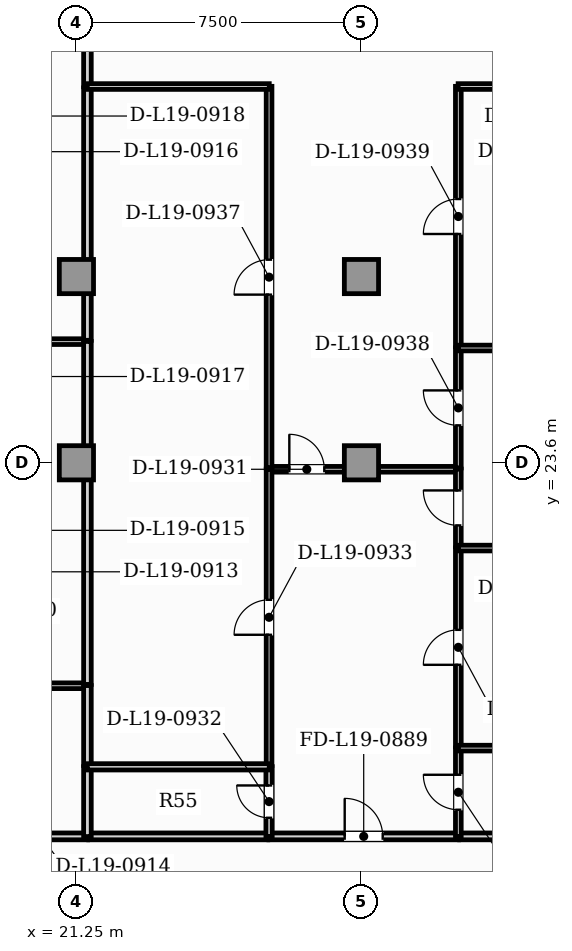
"""IFC4 building model, lengths in metres.
Left out: names, types, materials, properties, quantities, classifications, styles, units other than length and angle.
Written with IfcOpenShell. Run it as: python <this file> out.ifc"""

import sys

from ifc_helpers import new_model, si_unit, direction, frame, frame_2d, origin, origin_2d, place, context, subcontext, project, spatial, rectangle, extrude, element, fill, save


model = new_model("IFC4")
c1 = context("Model", 3, precision=1e-05, world=origin(), true_north=direction((0.0, 1.0)))
c2 = subcontext(c1, "Body", "Model", "MODEL_VIEW")
j1 = project(units=[si_unit("LENGTHUNIT", "METRE"), si_unit("PLANEANGLEUNIT", "RADIAN")], contexts=[c1])
p1 = place(None, origin())
s1 = spatial("IfcSite", under=j1, at=p1, CompositionType="ELEMENT")
p2 = place(p1, origin())
s2 = spatial("IfcBuilding", under=s1, at=p2, CompositionType="ELEMENT")
p3 = place(p2, frame((0.0, 0.0, 81.05)))
s3 = spatial("IfcBuildingStorey", under=s2, at=p3, CompositionType="ELEMENT", Elevation=81.05)
for number, where, z_axis, x_axis in (
    (1, (21.25, 23.6, 0.0), (0.0, 0.0, 1.0), (1.0, 0.0, 0.0)),
    (2, (28.75, 23.6, 0.0), (0.0, 0.0, 1.0), (1.0, 0.0, 0.0)),
    (3, (21.25, 28.5, 0.0), (0.0, 0.0, 1.0), (1.0, 0.0, 0.0)),
    (4, (28.75, 28.5, 0.0), (0.0, 0.0, 1.0), (1.0, 0.0, 0.0)),
):
    element("IfcColumn", number, at=place(p3, frame(where, z_axis=z_axis, x_axis=x_axis)), inside=s3, PredefinedType="COLUMN", context=c2, shape_type="SweptSolid", body=[
        extrude(rectangle(XDim=0.9, YDim=0.9, at=origin_2d()), origin(), (0.0, 0.0, 1.0), 3.85),
    ])
p4 = place(p3, frame((18.858, 13.77, 0.0), z_axis=(0.0, 0.0, 1.0), x_axis=(1.0, 0.0, 0.0)))
e5 = element("IfcWall", 5, at=p4, inside=s3, PredefinedType="PARTITIONING", context=c2, shape_type="SweptSolid", body=[
    extrude(rectangle(XDim=2.687, YDim=0.18, at=frame_2d((1.344, 0.0))), origin(), (0.0, 0.0, 1.0), 3.6),
])
p5 = place(p3, frame((26.314, 13.77, 0.0), z_axis=(0.0, 0.0, 1.0), x_axis=(1.0, 0.0, 0.0)))
e6 = element("IfcWall", 6, at=p5, inside=s3, PredefinedType="PARTITIONING", context=c2, shape_type="SweptSolid", body=[
    extrude(rectangle(XDim=4.99, YDim=0.18, at=frame_2d((2.495, 0.0))), origin(), (0.0, 0.0, 1.0), 3.6),
])
p6 = place(p5, frame((1.995, 0.0, 0.0)))
e7 = element("IfcOpeningElement", 7, at=p6, cuts=e6, PredefinedType="OPENING", context=c2, shape_type="SweptSolid", body=[
    extrude(rectangle(XDim=1.0, YDim=2.15, at=frame_2d((0.5, 1.075))), frame((0.0, 0.1, 0.0), z_axis=(0.0, -1.0, 0.0), x_axis=(1.0, 0.0, 0.0)), (0.0, 0.0, 1.0), 0.2),
])
p7 = place(p3, frame((21.575, 13.77, 0.0), z_axis=(0.0, 0.0, 1.0), x_axis=(1.0, 0.0, 0.0)))
e8 = element("IfcWall", 8, at=p7, inside=s3, PredefinedType="PARTITIONING", context=c2, shape_type="SweptSolid", body=[
    extrude(rectangle(XDim=4.709, YDim=0.18, at=frame_2d((2.354, 0.0))), origin(), (0.0, 0.0, 1.0), 3.6),
])
p8 = place(p3, frame((31.334, 13.77, 0.0), z_axis=(0.0, 0.0, 1.0), x_axis=(1.0, 0.0, 0.0)))
e9 = element("IfcWall", 9, at=p8, inside=s3, PredefinedType="PARTITIONING", context=c2, shape_type="SweptSolid", body=[
    extrude(rectangle(XDim=4.591, YDim=0.18, at=frame_2d((2.295, 0.0))), origin(), (0.0, 0.0, 1.0), 3.6),
])
p9 = place(p3, frame((18.818, 17.734, 0.0), z_axis=(0.0, 0.0, 1.0), x_axis=(1.0, 0.0, 0.0)))
e10 = element("IfcWall", 10, at=p9, inside=s3, PredefinedType="PARTITIONING", context=c2, shape_type="SweptSolid", body=[
    extrude(rectangle(XDim=2.727, YDim=0.15, at=frame_2d((1.364, 0.0))), origin(), (0.0, 0.0, 1.0), 3.6),
])
p10 = place(p3, frame((21.54, 13.765, 0.0), z_axis=(0.0, 0.0, 1.0), x_axis=(0.0, 1.0, 0.0)))
e11 = element("IfcWall", 11, at=p10, inside=s3, PredefinedType="PARTITIONING", context=c2, shape_type="SweptSolid", body=[
    extrude(rectangle(XDim=1.84, YDim=0.2, at=frame_2d((0.92, 0.0))), origin(), (0.0, 0.0, 1.0), 3.6),
])
p11 = place(p3, frame((21.54, 15.635, 0.0), z_axis=(0.0, 0.0, 1.0), x_axis=(0.0, 1.0, 0.0)))
e12 = element("IfcWall", 12, at=p11, inside=s3, PredefinedType="PARTITIONING", context=c2, shape_type="SweptSolid", body=[
    extrude(rectangle(XDim=2.104, YDim=0.2, at=frame_2d((1.052, 0.0))), origin(), (0.0, 0.0, 1.0), 3.6),
])
p12 = place(p3, frame((18.818, 26.788, 0.0), z_axis=(0.0, 0.0, 1.0), x_axis=(1.0, 0.0, 0.0)))
e13 = element("IfcWall", 13, at=p12, inside=s3, PredefinedType="PARTITIONING", context=c2, shape_type="SweptSolid", body=[
    extrude(rectangle(XDim=2.727, YDim=0.15, at=frame_2d((1.364, 0.0))), origin(), (0.0, 0.0, 1.0), 3.6),
])
p13 = place(p3, frame((21.54, 17.769, 0.0), z_axis=(0.0, 0.0, 1.0), x_axis=(0.0, 1.0, 0.0)))
e14 = element("IfcWall", 14, at=p13, inside=s3, PredefinedType="PARTITIONING", context=c2, shape_type="SweptSolid", body=[
    extrude(rectangle(XDim=9.024, YDim=0.2, at=frame_2d((4.512, 0.0))), origin(), (0.0, 0.0, 1.0), 3.6),
])
p14 = place(p3, frame((21.54, 33.495, 0.0), z_axis=(0.0, 0.0, 1.0), x_axis=(0.0, 1.0, 0.0)))
e15 = element("IfcWall", 15, at=p14, inside=s3, PredefinedType="PARTITIONING", context=c2, shape_type="SweptSolid", body=[
    extrude(rectangle(XDim=1.51, YDim=0.2, at=frame_2d((0.755, 0.0))), origin(), (0.0, 0.0, 1.0), 3.6),
])
p15 = place(p3, frame((21.54, 26.823, 0.0), z_axis=(0.0, 0.0, 1.0), x_axis=(0.0, 1.0, 0.0)))
e16 = element("IfcWall", 16, at=p15, inside=s3, PredefinedType="PARTITIONING", context=c2, shape_type="SweptSolid", body=[
    extrude(rectangle(XDim=6.642, YDim=0.2, at=frame_2d((3.321, 0.0))), origin(), (0.0, 0.0, 1.0), 3.6),
])
p16 = place(p3, frame((26.314, 23.429, 0.0), z_axis=(0.0, 0.0, 1.0), x_axis=(1.0, 0.0, 0.0)))
e17 = element("IfcWall", 17, at=p16, inside=s3, PredefinedType="PARTITIONING", context=c2, shape_type="SweptSolid", body=[
    extrude(rectangle(XDim=4.99, YDim=0.15, at=frame_2d((2.495, 0.0))), origin(), (0.0, 0.0, 1.0), 2.964),
])
p17 = place(p16, frame((0.538, 0.0, 0.0)))
e18 = element("IfcOpeningElement", 18, at=p17, cuts=e17, PredefinedType="OPENING", context=c2, shape_type="SweptSolid", body=[
    extrude(rectangle(XDim=0.92, YDim=2.1, at=frame_2d((0.46, 1.05))), frame((0.0, 0.085, 0.0), z_axis=(0.0, -1.0, 0.0), x_axis=(1.0, 0.0, 0.0)), (0.0, 0.0, 1.0), 0.17),
])
p18 = place(p3, frame((26.319, 13.765, 0.0), z_axis=(0.0, 0.0, 1.0), x_axis=(0.0, 1.0, 0.0)))
e19 = element("IfcWall", 19, at=p18, inside=s3, PredefinedType="PLUMBINGWALL", context=c2, shape_type="SweptSolid", body=[
    extrude(rectangle(XDim=1.84, YDim=0.165, at=frame_2d((0.92, 0.0))), origin(), (0.0, 0.0, 1.0), 3.6),
])
p19 = place(p18, frame((0.495, 0.0, 0.0)))
e20 = element("IfcOpeningElement", 20, at=p19, cuts=e19, PredefinedType="OPENING", context=c2, shape_type="SweptSolid", body=[
    extrude(rectangle(XDim=0.85, YDim=2.1, at=frame_2d((0.425, 1.05))), frame((0.0, 0.093, 0.0), z_axis=(0.0, -1.0, 0.0), x_axis=(1.0, 0.0, 0.0)), (0.0, 0.0, 1.0), 0.185),
])
p20 = place(p3, frame((26.319, 15.635, 0.0), z_axis=(0.0, 0.0, 1.0), x_axis=(0.0, 1.0, 0.0)))
e21 = element("IfcWall", 21, at=p20, inside=s3, PredefinedType="PARTITIONING", context=c2, shape_type="SweptSolid", body=[
    extrude(rectangle(XDim=7.799, YDim=0.15, at=frame_2d((3.9, 0.0))), origin(), (0.0, 0.0, 1.0), 3.6),
])
p21 = place(p20, frame((3.44, 0.0, 0.0)))
e22 = element("IfcOpeningElement", 22, at=p21, cuts=e21, PredefinedType="OPENING", context=c2, shape_type="SweptSolid", body=[
    extrude(rectangle(XDim=0.92, YDim=2.1, at=frame_2d((0.46, 1.05))), frame((0.0, 0.085, 0.0), z_axis=(0.0, -1.0, 0.0), x_axis=(1.0, 0.0, 0.0)), (0.0, 0.0, 1.0), 0.17),
])
p22 = place(p3, frame((31.299, 13.765, 0.0), z_axis=(0.0, 0.0, 1.0), x_axis=(0.0, 1.0, 0.0)))
e23 = element("IfcWall", 23, at=p22, inside=s3, PredefinedType="PARTITIONING", context=c2, shape_type="SweptSolid", body=[
    extrude(rectangle(XDim=2.333, YDim=0.15, at=frame_2d((1.166, 0.0))), origin(), (0.0, 0.0, 1.0), 3.6),
])
p23 = place(p22, frame((0.706, 0.0, 0.0)))
e24 = element("IfcOpeningElement", 24, at=p23, cuts=e23, PredefinedType="OPENING", context=c2, shape_type="SweptSolid", body=[
    extrude(rectangle(XDim=0.92, YDim=2.1, at=frame_2d((0.46, 1.05))), frame((0.0, 0.085, 0.0), z_axis=(0.0, -1.0, 0.0), x_axis=(1.0, 0.0, 0.0)), (0.0, 0.0, 1.0), 0.17),
])
p24 = place(p3, frame((31.299, 16.127, 0.0), z_axis=(0.0, 0.0, 1.0), x_axis=(0.0, 1.0, 0.0)))
e25 = element("IfcWall", 25, at=p24, inside=s3, PredefinedType="PARTITIONING", context=c2, shape_type="SweptSolid", body=[
    extrude(rectangle(XDim=5.234, YDim=0.15, at=frame_2d((2.617, 0.0))), origin(), (0.0, 0.0, 1.0), 3.6),
])
p25 = place(p24, frame((2.157, 0.0, 0.0)))
e26 = element("IfcOpeningElement", 26, at=p25, cuts=e25, PredefinedType="OPENING", context=c2, shape_type="SweptSolid", body=[
    extrude(rectangle(XDim=0.92, YDim=2.1, at=frame_2d((0.46, 1.05))), frame((0.0, 0.085, 0.0), z_axis=(0.0, -1.0, 0.0), x_axis=(1.0, 0.0, 0.0)), (0.0, 0.0, 1.0), 0.17),
])
p26 = place(p3, frame((31.299, 21.391, 0.0), z_axis=(0.0, 0.0, 1.0), x_axis=(0.0, 1.0, 0.0)))
e27 = element("IfcWall", 27, at=p26, inside=s3, PredefinedType="PARTITIONING", context=c2, shape_type="SweptSolid", body=[
    extrude(rectangle(XDim=2.043, YDim=0.15, at=frame_2d((1.021, 0.0))), origin(), (0.0, 0.0, 1.0), 3.6),
])
p27 = place(p26, frame((0.562, 0.0, 0.0)))
e28 = element("IfcOpeningElement", 28, at=p27, cuts=e27, PredefinedType="OPENING", context=c2, shape_type="SweptSolid", body=[
    extrude(rectangle(XDim=0.92, YDim=2.1, at=frame_2d((0.46, 1.05))), frame((0.0, 0.085, 0.0), z_axis=(0.0, -1.0, 0.0), x_axis=(1.0, 0.0, 0.0)), (0.0, 0.0, 1.0), 0.17),
])
p28 = place(p3, frame((26.319, 23.464, 0.0), z_axis=(0.0, 0.0, 1.0), x_axis=(0.0, 1.0, 0.0)))
e29 = element("IfcWall", 29, at=p28, inside=s3, PredefinedType="PARTITIONING", context=c2, shape_type="SweptSolid", body=[
    extrude(rectangle(XDim=10.041, YDim=0.15, at=frame_2d((5.02, 0.0))), origin(), (0.0, 0.0, 1.0), 3.6),
])
p29 = place(p28, frame((4.56, 0.0, 0.0)))
e30 = element("IfcOpeningElement", 30, at=p29, cuts=e29, PredefinedType="OPENING", context=c2, shape_type="SweptSolid", body=[
    extrude(rectangle(XDim=0.92, YDim=2.1, at=frame_2d((0.46, 1.05))), frame((0.0, 0.085, 0.0), z_axis=(0.0, -1.0, 0.0), x_axis=(1.0, 0.0, 0.0)), (0.0, 0.0, 1.0), 0.17),
])
p30 = place(p3, frame((21.535, 33.5, 0.0), z_axis=(0.0, 0.0, 1.0), x_axis=(1.0, 0.0, 0.0)))
e31 = element("IfcWall", 31, at=p30, inside=s3, PredefinedType="PARTITIONING", context=c2, shape_type="SweptSolid", body=[
    extrude(rectangle(XDim=4.789, YDim=0.15, at=frame_2d((2.395, 0.0))), origin(), (0.0, 0.0, 1.0), 3.6),
])
p31 = place(p3, frame((31.299, 23.464, 0.0), z_axis=(0.0, 0.0, 1.0), x_axis=(0.0, 1.0, 0.0)))
e32 = element("IfcWall", 32, at=p31, inside=s3, PredefinedType="PARTITIONING", context=c2, shape_type="SweptSolid", body=[
    extrude(rectangle(XDim=3.161, YDim=0.15, at=frame_2d((1.58, 0.0))), origin(), (0.0, 0.0, 1.0), 3.6),
])
p32 = place(p31, frame((1.12, 0.0, 0.0)))
e33 = element("IfcOpeningElement", 33, at=p32, cuts=e32, PredefinedType="OPENING", context=c2, shape_type="SweptSolid", body=[
    extrude(rectangle(XDim=0.92, YDim=2.1, at=frame_2d((0.46, 1.05))), frame((0.0, 0.085, 0.0), z_axis=(0.0, -1.0, 0.0), x_axis=(1.0, 0.0, 0.0)), (0.0, 0.0, 1.0), 0.17),
])
p33 = place(p3, frame((31.299, 26.655, 0.0), z_axis=(0.0, 0.0, 1.0), x_axis=(0.0, 1.0, 0.0)))
e34 = element("IfcWall", 34, at=p33, inside=s3, PredefinedType="PARTITIONING", context=c2, shape_type="SweptSolid", body=[
    extrude(rectangle(XDim=6.85, YDim=0.15, at=frame_2d((3.425, 0.0))), origin(), (0.0, 0.0, 1.0), 3.6),
])
p34 = place(p33, frame((2.965, 0.0, 0.0)))
e35 = element("IfcOpeningElement", 35, at=p34, cuts=e34, PredefinedType="OPENING", context=c2, shape_type="SweptSolid", body=[
    extrude(rectangle(XDim=0.92, YDim=2.1, at=frame_2d((0.46, 1.05))), frame((0.0, 0.085, 0.0), z_axis=(0.0, -1.0, 0.0), x_axis=(1.0, 0.0, 0.0)), (0.0, 0.0, 1.0), 0.17),
])
p35 = place(p3, frame((31.294, 33.5, 0.0), z_axis=(0.0, 0.0, 1.0), x_axis=(1.0, 0.0, 0.0)))
e36 = element("IfcWall", 36, at=p35, inside=s3, PredefinedType="PARTITIONING", context=c2, shape_type="SweptSolid", body=[
    extrude(rectangle(XDim=4.671, YDim=0.15, at=frame_2d((2.335, 0.0))), origin(), (0.0, 0.0, 1.0), 3.6),
])
p36 = place(p3, frame((21.535, 15.6, 0.0), z_axis=(0.0, 0.0, 1.0), x_axis=(1.0, 0.0, 0.0)))
e37 = element("IfcWall", 37, at=p36, inside=s3, PredefinedType="PLUMBINGWALL", context=c2, shape_type="SweptSolid", body=[
    extrude(rectangle(XDim=4.789, YDim=0.165, at=frame_2d((2.395, 0.0))), origin(), (0.0, 0.0, 1.0), 3.6),
])
for number, where, z_axis, x_axis in (
    (38, (31.294, 16.093, 0.0), (0.0, 0.0, 1.0), (1.0, 0.0, 0.0)),
    (39, (31.294, 21.356, 0.0), (0.0, 0.0, 1.0), (1.0, 0.0, 0.0)),
    (40, (31.294, 26.62, 0.0), (0.0, 0.0, 1.0), (1.0, 0.0, 0.0)),
):
    element("IfcWall", number, at=place(p3, frame(where, z_axis=z_axis, x_axis=x_axis)), inside=s3, PredefinedType="PARTITIONING", context=c2, shape_type="SweptSolid", body=[
        extrude(rectangle(XDim=4.671, YDim=0.15, at=frame_2d((2.335, 0.0))), origin(), (0.0, 0.0, 1.0), 3.6),
    ])
p37 = place(p6, origin())
e41 = element("IfcDoor", 41, at=p37, inside=s3, OperationType="SINGLE_SWING_LEFT", PredefinedType="DOOR", context=c2, shape_type="SweptSolid", body=[
    extrude(rectangle(XDim=1.0, YDim=2.15, at=frame_2d((0.5, 1.075))), frame((0.0, 0.025, 0.0), z_axis=(0.0, -1.0, 0.0), x_axis=(1.0, 0.0, 0.0)), (0.0, 0.0, 1.0), 0.05),
])
fill(e7, e41)
p38 = place(p17, origin())
e42 = element("IfcDoor", 42, at=p38, inside=s3, OperationType="SINGLE_SWING_LEFT", PredefinedType="DOOR", context=c2, shape_type="SweptSolid", body=[
    extrude(rectangle(XDim=0.92, YDim=2.1, at=frame_2d((0.46, 1.05))), frame((0.0, 0.025, 0.0), z_axis=(0.0, -1.0, 0.0), x_axis=(1.0, 0.0, 0.0)), (0.0, 0.0, 1.0), 0.05),
])
fill(e18, e42)
p39 = place(p19, origin())
e43 = element("IfcDoor", 43, at=p39, inside=s3, OperationType="SINGLE_SWING_RIGHT", PredefinedType="DOOR", context=c2, shape_type="SweptSolid", body=[
    extrude(rectangle(XDim=0.85, YDim=2.1, at=frame_2d((0.425, 1.05))), frame((0.0, 0.025, 0.0), z_axis=(0.0, -1.0, 0.0), x_axis=(1.0, 0.0, 0.0)), (0.0, 0.0, 1.0), 0.05),
])
fill(e20, e43)
p40 = place(p21, origin())
e44 = element("IfcDoor", 44, at=p40, inside=s3, OperationType="SINGLE_SWING_LEFT", PredefinedType="DOOR", context=c2, shape_type="SweptSolid", body=[
    extrude(rectangle(XDim=0.92, YDim=2.1, at=frame_2d((0.46, 1.05))), frame((0.0, 0.025, 0.0), z_axis=(0.0, -1.0, 0.0), x_axis=(1.0, 0.0, 0.0)), (0.0, 0.0, 1.0), 0.05),
])
fill(e22, e44)
p41 = place(p23, origin())
e45 = element("IfcDoor", 45, at=p41, inside=s3, OperationType="SINGLE_SWING_RIGHT", PredefinedType="DOOR", context=c2, shape_type="SweptSolid", body=[
    extrude(rectangle(XDim=0.92, YDim=2.1, at=frame_2d((0.46, 1.05))), frame((0.0, 0.025, 0.0), z_axis=(0.0, -1.0, 0.0), x_axis=(1.0, 0.0, 0.0)), (0.0, 0.0, 1.0), 0.05),
])
fill(e24, e45)
p42 = place(p25, origin())
e46 = element("IfcDoor", 46, at=p42, inside=s3, OperationType="SINGLE_SWING_LEFT", PredefinedType="DOOR", context=c2, shape_type="SweptSolid", body=[
    extrude(rectangle(XDim=0.92, YDim=2.1, at=frame_2d((0.46, 1.05))), frame((0.0, 0.025, 0.0), z_axis=(0.0, -1.0, 0.0), x_axis=(1.0, 0.0, 0.0)), (0.0, 0.0, 1.0), 0.05),
])
fill(e26, e46)
p43 = place(p27, origin())
e47 = element("IfcDoor", 47, at=p43, inside=s3, OperationType="SINGLE_SWING_RIGHT", PredefinedType="DOOR", context=c2, shape_type="SweptSolid", body=[
    extrude(rectangle(XDim=0.92, YDim=2.1, at=frame_2d((0.46, 1.05))), frame((0.0, 0.025, 0.0), z_axis=(0.0, -1.0, 0.0), x_axis=(1.0, 0.0, 0.0)), (0.0, 0.0, 1.0), 0.05),
])
fill(e28, e47)
p44 = place(p29, origin())
e48 = element("IfcDoor", 48, at=p44, inside=s3, OperationType="SINGLE_SWING_LEFT", PredefinedType="DOOR", context=c2, shape_type="SweptSolid", body=[
    extrude(rectangle(XDim=0.92, YDim=2.1, at=frame_2d((0.46, 1.05))), frame((0.0, 0.025, 0.0), z_axis=(0.0, -1.0, 0.0), x_axis=(1.0, 0.0, 0.0)), (0.0, 0.0, 1.0), 0.05),
])
fill(e30, e48)
p45 = place(p32, origin())
e49 = element("IfcDoor", 49, at=p45, inside=s3, OperationType="SINGLE_SWING_RIGHT", PredefinedType="DOOR", context=c2, shape_type="SweptSolid", body=[
    extrude(rectangle(XDim=0.92, YDim=2.1, at=frame_2d((0.46, 1.05))), frame((0.0, 0.025, 0.0), z_axis=(0.0, -1.0, 0.0), x_axis=(1.0, 0.0, 0.0)), (0.0, 0.0, 1.0), 0.05),
])
fill(e33, e49)
p46 = place(p34, origin())
e50 = element("IfcDoor", 50, at=p46, inside=s3, OperationType="SINGLE_SWING_LEFT", PredefinedType="DOOR", context=c2, shape_type="SweptSolid", body=[
    extrude(rectangle(XDim=0.92, YDim=2.1, at=frame_2d((0.46, 1.05))), frame((0.0, 0.025, 0.0), z_axis=(0.0, -1.0, 0.0), x_axis=(1.0, 0.0, 0.0)), (0.0, 0.0, 1.0), 0.05),
])
fill(e35, e50)
save(model, sys.argv[1])
